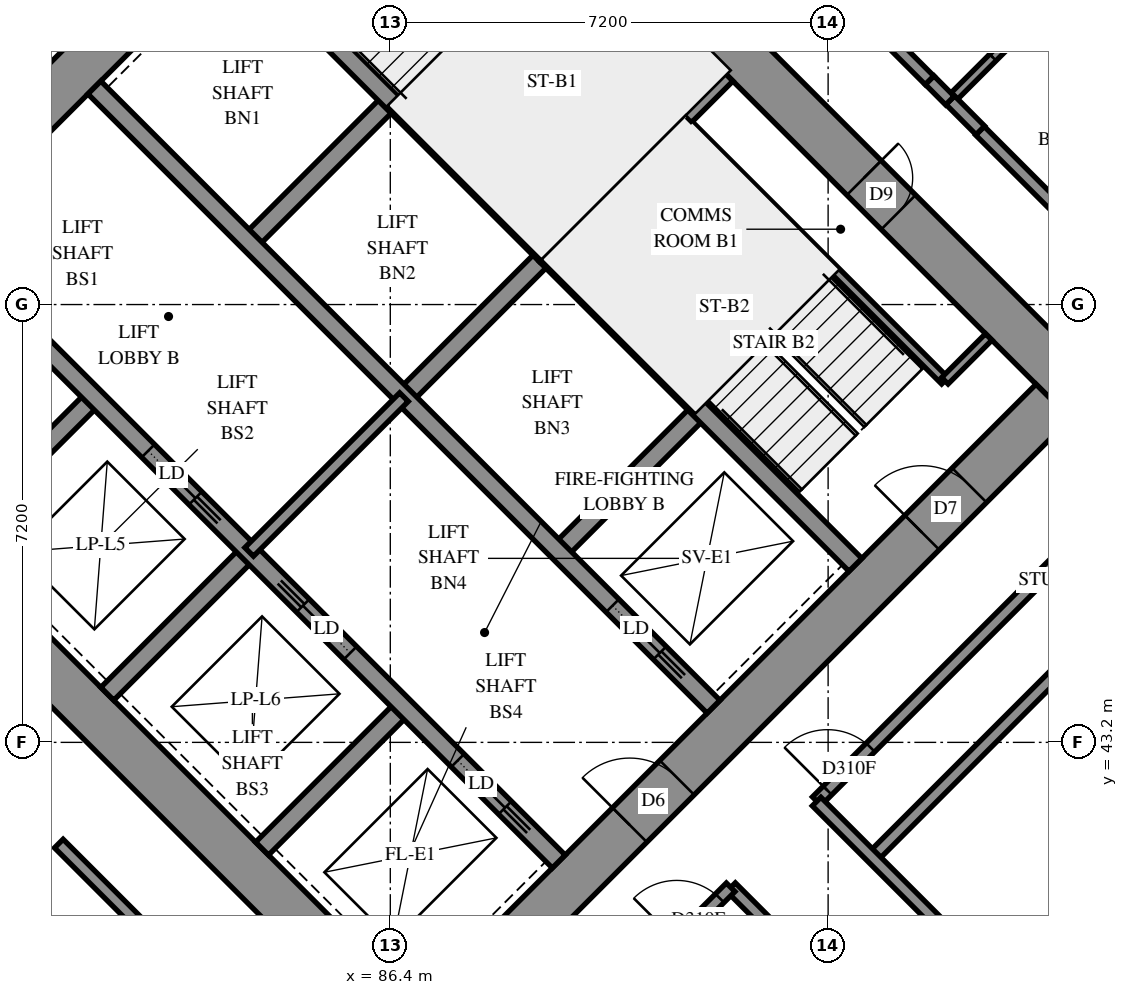
"""IFC4 building model, lengths in metres.
Left out: names, types, materials, properties, quantities, classifications, styles, units other than length and angle.
Written with IfcOpenShell. Run it as: python <this file> out.ifc"""

import sys

from ifc_helpers import new_model, si_unit, direction, frame, frame_2d, origin, place, context, subcontext, project, spatial, polyline, rectangle, outline, extrude, element, fill, save


model = new_model("IFC4")
c1 = context("Model", 3, precision=1e-05, world=origin(), true_north=direction((0.0, 1.0)))
c2 = subcontext(c1, "Body", "Model", "MODEL_VIEW")
j1 = project(units=[si_unit("LENGTHUNIT", "METRE"), si_unit("PLANEANGLEUNIT", "RADIAN")], contexts=[c1])
p1 = place(None, origin())
s1 = spatial("IfcSite", under=j1, at=p1, CompositionType="ELEMENT")
p2 = place(p1, origin())
s2 = spatial("IfcBuilding", under=s1, at=p2, CompositionType="ELEMENT")
p3 = place(p2, frame((0.0, 0.0, 108.4)))
s3 = spatial("IfcBuildingStorey", under=s2, at=p3, CompositionType="ELEMENT", Elevation=108.4)
p4 = place(p3, frame((75.806, 49.373, -0.3), z_axis=(0.0, 0.0, 1.0), x_axis=(0.7071067812, -0.7071067812, 0.0)))
e1 = element("IfcWall", 1, at=p4, inside=s3, PredefinedType="SHEAR", context=c2, shape_type="SweptSolid", body=[
    extrude(rectangle(XDim=16.0, YDim=0.8, at=frame_2d((8.0, 0.0))), origin(), (0.0, 0.0, 1.0), 2.7),
])
p5 = place(p3, frame((86.554, 60.121, -0.3), z_axis=(0.0, 0.0, 1.0), x_axis=(0.7071067812, -0.7071067812, 0.0)))
e2 = element("IfcWall", 2, at=p5, inside=s3, PredefinedType="SHEAR", context=c2, shape_type="SweptSolid", body=[
    extrude(rectangle(XDim=16.0, YDim=0.8, at=frame_2d((8.0, 0.0))), origin(), (0.0, 0.0, 1.0), 2.7),
])
p6 = place(p5, frame((10.8, 0.0, 0.3)))
e3 = element("IfcOpeningElement", 3, at=p6, cuts=e2, PredefinedType="OPENING", context=c2, shape_type="SweptSolid", body=[
    extrude(rectangle(XDim=0.8, YDim=2.1, at=frame_2d((0.4, 1.05))), frame((0.0, 0.41, 0.0), z_axis=(0.0, -1.0, 0.0), x_axis=(1.0, 0.0, 0.0)), (0.0, 0.0, 1.0), 0.82),
])
p7 = place(p3, frame((76.372, 49.373, -0.3), z_axis=(0.0, 0.0, 1.0), x_axis=(0.7071067812, 0.7071067812, 0.0)))
e4 = element("IfcWall", 4, at=p7, inside=s3, PredefinedType="SHEAR", context=c2, shape_type="SweptSolid", body=[
    extrude(rectangle(XDim=14.4, YDim=0.8, at=frame_2d((7.2, 0.0))), origin(), (0.0, 0.0, 1.0), 2.7),
])
p8 = place(p7, frame((4.55, 0.0, 0.3)))
e5 = element("IfcOpeningElement", 5, at=p8, cuts=e4, PredefinedType="OPENING", context=c2, shape_type="SweptSolid", body=[
    extrude(rectangle(XDim=1.1, YDim=2.1, at=frame_2d((0.55, 1.05))), frame((0.0, 0.41, 0.0), z_axis=(0.0, -1.0, 0.0), x_axis=(1.0, 0.0, 0.0)), (0.0, 0.0, 1.0), 0.82),
])
p9 = place(p7, frame((11.35, 0.0, 0.3)))
e6 = element("IfcOpeningElement", 6, at=p9, cuts=e4, PredefinedType="OPENING", context=c2, shape_type="SweptSolid", body=[
    extrude(rectangle(XDim=1.1, YDim=2.1, at=frame_2d((0.55, 1.05))), frame((0.0, 0.41, 0.0), z_axis=(0.0, -1.0, 0.0), x_axis=(1.0, 0.0, 0.0)), (0.0, 0.0, 1.0), 0.82),
])
p10 = place(p3, frame((87.12, 38.625, -0.3), z_axis=(0.0, 0.0, 1.0), x_axis=(0.7071067812, 0.7071067812, 0.0)))
e7 = element("IfcWall", 7, at=p10, inside=s3, PredefinedType="SHEAR", context=c2, shape_type="SweptSolid", body=[
    extrude(rectangle(XDim=14.4, YDim=0.8, at=frame_2d((7.2, 0.0))), origin(), (0.0, 0.0, 1.0), 2.7),
])
p11 = place(p10, frame((4.55, 0.0, 0.3)))
e8 = element("IfcOpeningElement", 8, at=p11, cuts=e7, PredefinedType="OPENING", context=c2, shape_type="SweptSolid", body=[
    extrude(rectangle(XDim=1.1, YDim=2.1, at=frame_2d((0.55, 1.05))), frame((0.0, 0.41, 0.0), z_axis=(0.0, -1.0, 0.0), x_axis=(1.0, 0.0, 0.0)), (0.0, 0.0, 1.0), 0.82),
])
p12 = place(p10, frame((11.35, 0.0, 0.3)))
e9 = element("IfcOpeningElement", 9, at=p12, cuts=e7, PredefinedType="OPENING", context=c2, shape_type="SweptSolid", body=[
    extrude(rectangle(XDim=1.1, YDim=2.1, at=frame_2d((0.55, 1.05))), frame((0.0, 0.41, 0.0), z_axis=(0.0, -1.0, 0.0), x_axis=(1.0, 0.0, 0.0)), (0.0, 0.0, 1.0), 0.82),
])
for number, where, z_axis, x_axis in (
    (10, (79.2, 46.544, 0.0), (0.0, 0.0, 1.0), (0.707, 0.707, 0.0)),
    (11, (84.079, 51.423, 0.0), (0.0, 0.0, 1.0), (0.707, 0.707, 0.0)),
):
    element("IfcWall", number, at=place(p3, frame(where, z_axis=z_axis, x_axis=x_axis)), inside=s3, PredefinedType="SOLIDWALL", context=c2, shape_type="SweptSolid", body=[
        extrude(rectangle(XDim=3.3, YDim=0.3, at=frame_2d((1.65, 0.0))), origin(), (0.0, 0.0, 1.0), 3.1),
    ])
p13 = place(p3, frame((81.746, 43.999, 0.0), z_axis=(0.0, 0.0, 1.0), x_axis=(0.7071067812, 0.7071067812, 0.0)))
e12 = element("IfcWall", 12, at=p13, inside=s3, PredefinedType="SOLIDWALL", context=c2, shape_type="SweptSolid", body=[
    extrude(rectangle(XDim=3.3, YDim=0.3, at=frame_2d((1.65, 0.0))), origin(), (0.0, 0.0, 1.0), 3.1),
])
p14 = place(p3, frame((86.625, 48.878, 0.0), z_axis=(0.0, 0.0, 1.0), x_axis=(0.7071067812, 0.7071067812, 0.0)))
e13 = element("IfcWall", 13, at=p14, inside=s3, PredefinedType="SOLIDWALL", context=c2, shape_type="SweptSolid", body=[
    extrude(rectangle(XDim=3.3, YDim=0.3, at=frame_2d((1.65, 0.0))), origin(), (0.0, 0.0, 1.0), 3.1),
])
p15 = place(p3, frame((84.291, 41.453, 0.0), z_axis=(0.0, 0.0, 1.0), x_axis=(0.7071067812, 0.7071067812, 0.0)))
e14 = element("IfcWall", 14, at=p15, inside=s3, PredefinedType="SOLIDWALL", context=c2, shape_type="SweptSolid", body=[
    extrude(rectangle(XDim=3.3, YDim=0.3, at=frame_2d((1.65, 0.0))), origin(), (0.0, 0.0, 1.0), 3.1),
])
p16 = place(p3, frame((89.17, 46.332, 0.0), z_axis=(0.0, 0.0, 1.0), x_axis=(0.7071067812, 0.7071067812, 0.0)))
e15 = element("IfcWall", 15, at=p16, inside=s3, PredefinedType="SOLIDWALL", context=c2, shape_type="SweptSolid", body=[
    extrude(rectangle(XDim=3.3, YDim=0.3, at=frame_2d((1.65, 0.0))), origin(), (0.0, 0.0, 1.0), 3.1),
])
p17 = place(p3, frame((78.988, 51.423, 0.0), z_axis=(0.0, 0.0, 1.0), x_axis=(0.7071067812, -0.7071067812, 0.0)))
e16 = element("IfcWall", 16, at=p17, inside=s3, PredefinedType="SOLIDWALL", context=c2, shape_type="SweptSolid", body=[
    extrude(rectangle(XDim=14.4, YDim=0.3, at=frame_2d((7.2, 0.0))), origin(), (0.0, 0.0, 1.0), 3.1),
])
p18 = place(p17, frame((1.25, 0.0, 0.0)))
e17 = element("IfcOpeningElement", 17, at=p18, cuts=e16, PredefinedType="OPENING", context=c2, shape_type="SweptSolid", body=[
    extrude(rectangle(XDim=1.1, YDim=2.1, at=frame_2d((0.55, 1.05))), frame((0.0, 0.16, 0.0), z_axis=(0.0, -1.0, 0.0), x_axis=(1.0, 0.0, 0.0)), (0.0, 0.0, 1.0), 0.32),
])
p19 = place(p17, frame((4.85, 0.0, 0.0)))
e18 = element("IfcOpeningElement", 18, at=p19, cuts=e16, PredefinedType="OPENING", context=c2, shape_type="SweptSolid", body=[
    extrude(rectangle(XDim=1.1, YDim=2.1, at=frame_2d((0.55, 1.05))), frame((0.0, 0.16, 0.0), z_axis=(0.0, -1.0, 0.0), x_axis=(1.0, 0.0, 0.0)), (0.0, 0.0, 1.0), 0.32),
])
p20 = place(p17, frame((8.45, 0.0, 0.0)))
e19 = element("IfcOpeningElement", 19, at=p20, cuts=e16, PredefinedType="OPENING", context=c2, shape_type="SweptSolid", body=[
    extrude(rectangle(XDim=1.1, YDim=2.1, at=frame_2d((0.55, 1.05))), frame((0.0, 0.16, 0.0), z_axis=(0.0, -1.0, 0.0), x_axis=(1.0, 0.0, 0.0)), (0.0, 0.0, 1.0), 0.32),
])
p21 = place(p17, frame((12.05, 0.0, 0.0)))
e20 = element("IfcOpeningElement", 20, at=p21, cuts=e16, PredefinedType="OPENING", context=c2, shape_type="SweptSolid", body=[
    extrude(rectangle(XDim=1.1, YDim=2.1, at=frame_2d((0.55, 1.05))), frame((0.0, 0.16, 0.0), z_axis=(0.0, -1.0, 0.0), x_axis=(1.0, 0.0, 0.0)), (0.0, 0.0, 1.0), 0.32),
])
p22 = place(p3, frame((81.534, 53.969, 0.0), z_axis=(0.0, 0.0, 1.0), x_axis=(0.707103309, -0.7071102534, 0.0)))
e21 = element("IfcWall", 21, at=p22, inside=s3, PredefinedType="SOLIDWALL", context=c2, shape_type="SweptSolid", body=[
    extrude(rectangle(XDim=14.4, YDim=0.3, at=frame_2d((7.2, 0.0))), origin(), (0.0, 0.0, 1.0), 3.1),
])
p23 = place(p22, frame((12.05, 0.0, 0.0)))
e22 = element("IfcOpeningElement", 22, at=p23, cuts=e21, PredefinedType="OPENING", context=c2, shape_type="SweptSolid", body=[
    extrude(rectangle(XDim=1.1, YDim=2.1, at=frame_2d((0.55, 1.05))), frame((0.0, 0.16, 0.0), z_axis=(0.0, -1.0, 0.0), x_axis=(1.0, 0.0, 0.0)), (0.0, 0.0, 1.0), 0.32),
])
for number, where, z_axis, x_axis in (
    (23, (83.867, 56.302, 0.0), (0.0, 0.0, 1.0), (0.707, -0.707, 0.0)),
    (24, (88.958, 51.211, 0.0), (0.0, 0.0, 1.0), (0.707, -0.707, 0.0)),
):
    element("IfcWall", number, at=place(p3, frame(where, z_axis=z_axis, x_axis=x_axis)), inside=s3, PredefinedType="SOLIDWALL", context=c2, shape_type="SweptSolid", body=[
        extrude(rectangle(XDim=7.2, YDim=0.3, at=frame_2d((3.6, 0.0))), origin(), (0.0, 0.0, 1.0), 3.1),
    ])
p24 = place(p3, frame((88.958, 51.211, 0.0), z_axis=(0.0, 0.0, 1.0), x_axis=(0.7071067812, 0.7071067812, 0.0)))
e25 = element("IfcWall", 25, at=p24, inside=s3, PredefinedType="SOLIDWALL", context=c2, shape_type="SweptSolid", body=[
    extrude(rectangle(XDim=4.2, YDim=0.3, at=frame_2d((2.1, 0.0))), origin(), (0.0, 0.0, 1.0), 3.1),
])
p25 = place(p3, frame((98.851, 54.419, 0.0), z_axis=(0.0, 0.0, 1.0), x_axis=(-0.8092802019, 0.5874228075, 0.0)))
e26 = element("IfcWall", 26, at=p25, inside=s3, PredefinedType="SOLIDWALL", context=c2, shape_type="SweptSolid", body=[
    extrude(outline(polyline([(-0.044, -0.275), (3.411, -0.275), (3.499, 0.275), (0.044, 0.275), (-0.044, -0.275)])), origin(), (0.0, 0.0, 1.0), 3.1),
])
p26 = place(p25, frame((0.422, 0.0, 0.5)))
e27 = element("IfcOpeningElement", 27, at=p26, cuts=e26, PredefinedType="OPENING", context=c2, shape_type="SweptSolid", body=[
    extrude(rectangle(XDim=1.2, YDim=2.45, at=frame_2d((0.6, 1.225))), frame((0.0, 0.285, 0.0), z_axis=(0.0, -1.0, 0.0), x_axis=(1.0, 0.0, 0.0)), (0.0, 0.0, 1.0), 0.57),
])
p27 = place(p25, frame((2.1, 0.0, 0.45)))
e28 = element("IfcOpeningElement", 28, at=p27, cuts=e26, PredefinedType="OPENING", context=c2, shape_type="SweptSolid", body=[
    extrude(rectangle(XDim=1.0, YDim=2.5, at=frame_2d((0.5, 1.25))), frame((0.0, 0.285, 0.0), z_axis=(0.0, -1.0, 0.0), x_axis=(1.0, 0.0, 0.0)), (0.0, 0.0, 1.0), 0.57),
])
p28 = place(p3, frame((91.313, 53.354, 0.0), z_axis=(0.0, 0.0, 1.0), x_axis=(0.7071067812, -0.7071067812, 0.0)))
e29 = element("IfcWall", 29, at=p28, inside=s3, PredefinedType="PARTITIONING", context=c2, shape_type="SweptSolid", body=[
    extrude(rectangle(XDim=5.95, YDim=0.15, at=frame_2d((2.975, 0.0))), origin(), (0.0, 0.0, 1.0), 3.1),
])
p29 = place(p3, frame((95.52, 49.146, 0.0), z_axis=(0.0, 0.0, 1.0), x_axis=(0.7071067812, 0.7071067812, 0.0)))
e30 = element("IfcWall", 30, at=p29, inside=s3, PredefinedType="PARTITIONING", context=c2, shape_type="SweptSolid", body=[
    extrude(rectangle(XDim=1.02, YDim=0.15, at=frame_2d((0.51, 0.0))), origin(), (0.0, 0.0, 1.0), 3.1),
])
p30 = place(p3, frame((84.079, 46.332, 0.0), z_axis=(0.0, 0.0, 1.0), x_axis=(0.7071067812, 0.7071067812, 0.0)))
e31 = element("IfcWall", 31, at=p30, inside=s3, PredefinedType="PARTITIONING", context=c2, shape_type="SweptSolid", body=[
    extrude(rectangle(XDim=3.6, YDim=0.2, at=frame_2d((1.8, 0.0))), origin(), (0.0, 0.0, 1.0), 3.1),
])
p31 = place(p3, frame((92.004, 40.819, 0.0), z_axis=(0.0, 0.0, 1.0), x_axis=(0.7071067812, -0.7071067812, 0.0)))
e32 = element("IfcWall", 32, at=p31, inside=s3, PredefinedType="PARTITIONING", context=c2, shape_type="SweptSolid", body=[
    extrude(rectangle(XDim=19.298, YDim=0.2, at=frame_2d((9.649, 0.0))), origin(), (0.0, 0.0, 1.0), 3.1),
])
p32 = place(p31, frame((3.489, 0.0, 0.0)))
e33 = element("IfcOpeningElement", 33, at=p32, cuts=e32, PredefinedType="OPENING", context=c2, shape_type="SweptSolid", body=[
    extrude(rectangle(XDim=0.9, YDim=2.1, at=frame_2d((0.45, 1.05))), frame((0.0, 0.11, 0.0), z_axis=(0.0, -1.0, 0.0), x_axis=(1.0, 0.0, 0.0)), (0.0, 0.0, 1.0), 0.22),
])
p33 = place(p31, frame((9.319, 0.0, 0.0)))
e34 = element("IfcOpeningElement", 34, at=p33, cuts=e32, PredefinedType="OPENING", context=c2, shape_type="SweptSolid", body=[
    extrude(rectangle(XDim=0.9, YDim=2.1, at=frame_2d((0.45, 1.05))), frame((0.0, 0.11, 0.0), z_axis=(0.0, -1.0, 0.0), x_axis=(1.0, 0.0, 0.0)), (0.0, 0.0, 1.0), 0.22),
])
p34 = place(p31, frame((15.961, 0.0, 0.0)))
e35 = element("IfcOpeningElement", 35, at=p34, cuts=e32, PredefinedType="OPENING", context=c2, shape_type="SweptSolid", body=[
    extrude(rectangle(XDim=0.9, YDim=2.1, at=frame_2d((0.45, 1.05))), frame((0.0, 0.11, 0.0), z_axis=(0.0, -1.0, 0.0), x_axis=(1.0, 0.0, 0.0)), (0.0, 0.0, 1.0), 0.22),
])
p35 = place(p3, frame((94.331, 41.313, 0.0), z_axis=(0.0, 0.0, 1.0), x_axis=(0.7071109253, 0.7071026371, 0.0)))
e36 = element("IfcWall", 36, at=p35, inside=s3, PredefinedType="PARTITIONING", context=c2, shape_type="SweptSolid", body=[
    extrude(rectangle(XDim=12.065, YDim=0.2, at=frame_2d((6.033, 0.0))), origin(), (0.0, 0.0, 1.0), 3.1),
])
p36 = place(p3, frame((87.894, 61.461, 0.0), z_axis=(0.0, 0.0, 1.0), x_axis=(0.7071067812, -0.7071067812, 0.0)))
e37 = element("IfcWall", 37, at=p36, inside=s3, PredefinedType="PARTITIONING", context=c2, shape_type="SweptSolid", body=[
    extrude(rectangle(XDim=10.428, YDim=0.2, at=frame_2d((5.214, 0.0))), origin(), (0.0, 0.0, 1.0), 3.1),
])
p37 = place(p36, frame((6.39, 0.0, 0.0)))
e38 = element("IfcOpeningElement", 38, at=p37, cuts=e37, PredefinedType="OPENING", context=c2, shape_type="SweptSolid", body=[
    extrude(rectangle(XDim=0.9, YDim=2.1, at=frame_2d((0.45, 1.05))), frame((0.0, 0.11, 0.0), z_axis=(0.0, -1.0, 0.0), x_axis=(1.0, 0.0, 0.0)), (0.0, 0.0, 1.0), 0.22),
])
p38 = place(p3, frame((93.413, 42.233, 0.0), z_axis=(0.0, 0.0, 1.0), x_axis=(0.7071067812, 0.7071067812, 0.0)))
e39 = element("IfcWall", 39, at=p38, inside=s3, PredefinedType="PARTITIONING", context=c2, shape_type="SweptSolid", body=[
    extrude(rectangle(XDim=9.699, YDim=0.2, at=frame_2d((4.849, 0.0))), origin(), (0.0, 0.0, 1.0), 3.1),
])
p39 = place(p38, frame((0.249, 0.0, 0.0)))
e40 = element("IfcOpeningElement", 40, at=p39, cuts=e39, PredefinedType="OPENING", context=c2, shape_type="SweptSolid", body=[
    extrude(rectangle(XDim=1.0, YDim=2.1, at=frame_2d((0.5, 1.05))), frame((0.0, 0.11, 0.0), z_axis=(0.0, -1.0, 0.0), x_axis=(1.0, 0.0, 0.0)), (0.0, 0.0, 1.0), 0.22),
])
p40 = place(p3, frame((93.411, 42.227, 0.0), z_axis=(0.0, 0.0, 1.0), x_axis=(0.7071067812, -0.7071067812, 0.0)))
e41 = element("IfcWall", 41, at=p40, inside=s3, PredefinedType="PARTITIONING", context=c2, shape_type="SweptSolid", body=[
    extrude(rectangle(XDim=8.499, YDim=0.2, at=frame_2d((4.25, 0.0))), origin(), (0.0, 0.0, 1.0), 3.1),
])
p41 = place(p40, frame((3.672, 0.0, 0.0)))
e42 = element("IfcOpeningElement", 42, at=p41, cuts=e41, PredefinedType="OPENING", context=c2, shape_type="SweptSolid", body=[
    extrude(rectangle(XDim=1.0, YDim=2.1, at=frame_2d((0.5, 1.05))), frame((0.0, 0.11, 0.0), z_axis=(0.0, -1.0, 0.0), x_axis=(1.0, 0.0, 0.0)), (0.0, 0.0, 1.0), 0.22),
])
p42 = place(p3, frame((86.835, 35.655, 0.0), z_axis=(0.0, 0.0, 1.0), x_axis=(0.7071067812, 0.7071067812, 0.0)))
e43 = element("IfcWall", 43, at=p42, inside=s3, PredefinedType="PARTITIONING", context=c2, shape_type="SweptSolid", body=[
    extrude(rectangle(XDim=7.3, YDim=0.2, at=frame_2d((3.65, 0.0))), origin(), (0.0, 0.0, 1.0), 3.1),
])
p43 = place(p42, frame((6.046, 0.0, 0.0)))
e44 = element("IfcOpeningElement", 44, at=p43, cuts=e43, PredefinedType="OPENING", context=c2, shape_type="SweptSolid", body=[
    extrude(rectangle(XDim=1.0, YDim=2.1, at=frame_2d((0.5, 1.05))), frame((0.0, 0.11, 0.0), z_axis=(0.0, -1.0, 0.0), x_axis=(1.0, 0.0, 0.0)), (0.0, 0.0, 1.0), 0.22),
])
p44 = place(p3, frame((80.948, 41.536, 0.0), z_axis=(0.0, 0.0, 1.0), x_axis=(0.7071067812, -0.7071067812, 0.0)))
e45 = element("IfcWall", 45, at=p44, inside=s3, PredefinedType="PARTITIONING", context=c2, shape_type="SweptSolid", body=[
    extrude(rectangle(XDim=6.822, YDim=0.2, at=frame_2d((3.411, 0.0))), origin(), (0.0, 0.0, 1.0), 3.1),
])
p45 = place(p3, frame((96.097, 53.258, 0.0), z_axis=(0.0, 0.0, 1.0), x_axis=(0.7071067812, -0.7071067812, 0.0)))
e46 = element("IfcWall", 46, at=p45, inside=s3, PredefinedType="PARTITIONING", context=c2, shape_type="SweptSolid", body=[
    extrude(rectangle(XDim=5.9, YDim=0.2, at=frame_2d((2.95, 0.0))), origin(), (0.0, 0.0, 1.0), 3.1),
])
p46 = place(p45, frame((2.006, 0.0, 0.0)))
e47 = element("IfcOpeningElement", 47, at=p46, cuts=e46, PredefinedType="OPENING", context=c2, shape_type="SweptSolid", body=[
    extrude(rectangle(XDim=0.9, YDim=2.1, at=frame_2d((0.45, 1.05))), frame((0.0, 0.11, 0.0), z_axis=(0.0, -1.0, 0.0), x_axis=(1.0, 0.0, 0.0)), (0.0, 0.0, 1.0), 0.22),
])
p47 = place(p3, frame((95.605, 53.759, 0.0), z_axis=(0.0, 0.0, 1.0), x_axis=(0.7071067812, 0.7071067812, 0.0)))
e48 = element("IfcWall", 48, at=p47, inside=s3, PredefinedType="PARTITIONING", context=c2, shape_type="SweptSolid", body=[
    extrude(rectangle(XDim=2.193, YDim=0.15, at=frame_2d((1.096, 0.0))), origin(), (0.0, 0.0, 1.0), 3.1),
])
p48 = place(p47, frame((0.997, 0.0, 0.0)))
e49 = element("IfcOpeningElement", 49, at=p48, cuts=e48, PredefinedType="OPENING", context=c2, shape_type="SweptSolid", body=[
    extrude(rectangle(XDim=0.8, YDim=2.1, at=frame_2d((0.4, 1.05))), frame((0.0, 0.085, 0.0), z_axis=(0.0, -1.0, 0.0), x_axis=(1.0, 0.0, 0.0)), (0.0, 0.0, 1.0), 0.17),
])
p49 = place(p3, frame((95.609, 53.761, 0.0), z_axis=(0.0, 0.0, 1.0), x_axis=(0.7056768426, -0.7085338339, 0.0)))
e50 = element("IfcWall", 50, at=p49, inside=s3, PredefinedType="PARTITIONING", context=c2, shape_type="SweptSolid", body=[
    extrude(rectangle(XDim=0.7, YDim=0.2, at=frame_2d((0.35, 0.0))), origin(), (0.0, 0.0, 1.0), 3.1),
])
p50 = place(p3, frame((95.271, 54.089, 0.0), z_axis=(0.0, 0.0, 1.0), x_axis=(0.7049801586, -0.7092270271, 0.0)))
e51 = element("IfcWall", 51, at=p50, inside=s3, PredefinedType="PARTITIONING", context=c2, shape_type="SweptSolid", body=[
    extrude(rectangle(XDim=0.471, YDim=0.2, at=frame_2d((0.235, 0.0))), origin(), (0.0, 0.0, 1.0), 3.1),
])
p51 = place(p6, origin())
e52 = element("IfcDoor", 52, at=p51, inside=s3, OperationType="SINGLE_SWING_RIGHT", PredefinedType="DOOR", context=c2, shape_type="SweptSolid", body=[
    extrude(rectangle(XDim=0.8, YDim=2.1, at=frame_2d((0.4, 1.05))), frame((0.0, -0.34, 0.0), z_axis=(0.0, -1.0, 0.0), x_axis=(1.0, 0.0, 0.0)), (0.0, 0.0, 1.0), 0.05),
])
fill(e3, e52)
p52 = place(p11, origin())
e53 = element("IfcDoor", 53, at=p52, inside=s3, OperationType="DOUBLE_DOOR_SINGLE_SWING", PredefinedType="DOOR", context=c2, shape_type="SweptSolid", body=[
    extrude(rectangle(XDim=1.1, YDim=2.1, at=frame_2d((0.55, 1.05))), frame((0.0, 0.025, 0.0), z_axis=(0.0, -1.0, 0.0), x_axis=(1.0, 0.0, 0.0)), (0.0, 0.0, 1.0), 0.05),
])
fill(e8, e53)
p53 = place(p12, origin())
e54 = element("IfcDoor", 54, at=p53, inside=s3, OperationType="SINGLE_SWING_RIGHT", PredefinedType="DOOR", context=c2, shape_type="SweptSolid", body=[
    extrude(rectangle(XDim=1.1, YDim=2.1, at=frame_2d((0.55, 1.05))), frame((0.0, 0.025, 0.0), z_axis=(0.0, -1.0, 0.0), x_axis=(1.0, 0.0, 0.0)), (0.0, 0.0, 1.0), 0.05),
])
fill(e9, e54)
p54 = place(p19, origin())
e55 = element("IfcDoor", 55, at=p54, inside=s3, OperationType="SLIDING_TO_RIGHT", PredefinedType="DOOR", context=c2, shape_type="SweptSolid", body=[
    extrude(rectangle(XDim=1.1, YDim=2.1, at=frame_2d((0.55, 1.05))), frame((0.0, 0.025, 0.0), z_axis=(0.0, -1.0, 0.0), x_axis=(1.0, 0.0, 0.0)), (0.0, 0.0, 1.0), 0.05),
])
fill(e18, e55)
p55 = place(p20, origin())
e56 = element("IfcDoor", 56, at=p55, inside=s3, OperationType="SLIDING_TO_LEFT", PredefinedType="DOOR", context=c2, shape_type="SweptSolid", body=[
    extrude(rectangle(XDim=1.1, YDim=2.1, at=frame_2d((0.55, 1.05))), frame((0.0, 0.025, 0.0), z_axis=(0.0, -1.0, 0.0), x_axis=(1.0, 0.0, 0.0)), (0.0, 0.0, 1.0), 0.05),
])
fill(e19, e56)
p56 = place(p21, origin())
e57 = element("IfcDoor", 57, at=p56, inside=s3, OperationType="SLIDING_TO_RIGHT", PredefinedType="DOOR", context=c2, shape_type="SweptSolid", body=[
    extrude(rectangle(XDim=1.1, YDim=2.1, at=frame_2d((0.55, 1.05))), frame((0.0, 0.025, 0.0), z_axis=(0.0, -1.0, 0.0), x_axis=(1.0, 0.0, 0.0)), (0.0, 0.0, 1.0), 0.05),
])
fill(e20, e57)
p57 = place(p23, origin())
e58 = element("IfcDoor", 58, at=p57, inside=s3, OperationType="SLIDING_TO_RIGHT", PredefinedType="DOOR", context=c2, shape_type="SweptSolid", body=[
    extrude(rectangle(XDim=1.1, YDim=2.1, at=frame_2d((0.55, 1.05))), frame((0.0, 0.025, 0.0), z_axis=(0.0, -1.0, 0.0), x_axis=(1.0, 0.0, 0.0)), (0.0, 0.0, 1.0), 0.05),
])
fill(e22, e58)
p58 = place(p48, origin())
e59 = element("IfcDoor", 59, at=p58, inside=s3, OperationType="SINGLE_SWING_RIGHT", PredefinedType="DOOR", context=c2, shape_type="SweptSolid", body=[
    extrude(rectangle(XDim=0.8, YDim=2.1, at=frame_2d((0.4, 1.05))), frame((0.0, 0.025, 0.0), z_axis=(0.0, -1.0, 0.0), x_axis=(1.0, 0.0, 0.0)), (0.0, 0.0, 1.0), 0.05),
])
fill(e49, e59)
p59 = place(p39, origin())
e60 = element("IfcDoor", 60, at=p59, inside=s3, OperationType="SINGLE_SWING_LEFT", PredefinedType="DOOR", context=c2, shape_type="SweptSolid", body=[
    extrude(rectangle(XDim=1.0, YDim=2.1, at=frame_2d((0.5, 1.05))), frame((0.0, 0.025, 0.0), z_axis=(0.0, -1.0, 0.0), x_axis=(1.0, 0.0, 0.0)), (0.0, 0.0, 1.0), 0.05),
])
fill(e40, e60)
p60 = place(p43, origin())
e61 = element("IfcDoor", 61, at=p60, inside=s3, OperationType="SINGLE_SWING_RIGHT", PredefinedType="DOOR", context=c2, shape_type="SweptSolid", body=[
    extrude(rectangle(XDim=1.0, YDim=2.1, at=frame_2d((0.5, 1.05))), frame((0.0, 0.025, 0.0), z_axis=(0.0, -1.0, 0.0), x_axis=(1.0, 0.0, 0.0)), (0.0, 0.0, 1.0), 0.05),
])
fill(e44, e61)
save(model, sys.argv[1])
